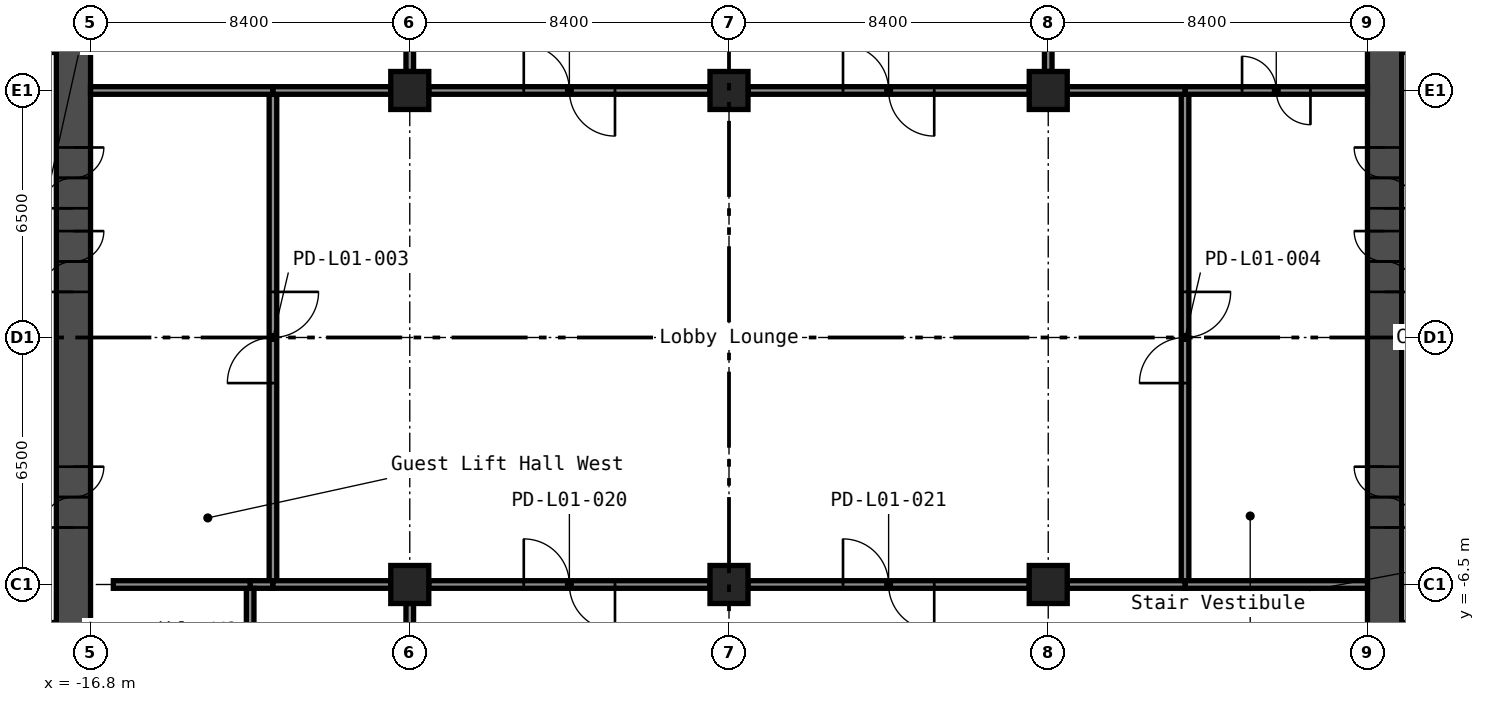
"""IFC4 building model, lengths in metres.
Left out: names, types, materials, properties, quantities, classifications, styles, units other than length and angle.
Written with IfcOpenShell. Run it as: python <this file> out.ifc"""

import sys

from ifc_helpers import new_model, si_unit, direction, frame, frame_2d, origin, origin_2d, place, context, subcontext, project, spatial, rectangle, hollow_rectangle, extrude, element, fill, save


model = new_model("IFC4")
c1 = context("Model", 3, precision=1e-05, world=origin(), true_north=direction((0.0, 1.0)))
c2 = subcontext(c1, "Body", "Model", "MODEL_VIEW")
j1 = project(units=[si_unit("LENGTHUNIT", "METRE"), si_unit("PLANEANGLEUNIT", "RADIAN")], contexts=[c1])
p1 = place(None, origin())
s1 = spatial("IfcSite", under=j1, at=p1, CompositionType="ELEMENT")
p2 = place(p1, origin())
s2 = spatial("IfcBuilding", under=s1, at=p2, CompositionType="ELEMENT")
p3 = place(p2, origin())
s3 = spatial("IfcBuildingStorey", under=s2, at=p3, CompositionType="ELEMENT", Elevation=0.0)
for number, where, z_axis, x_axis in (
    (1, (-8.4, -6.5, -0.3), (0.0, 0.0, 1.0), (1.0, 0.0, 0.0)),
    (2, (-8.4, 6.5, -0.3), (0.0, 0.0, 1.0), (1.0, 0.0, 0.0)),
    (3, (0.0, -6.5, -0.3), (0.0, 0.0, 1.0), (1.0, 0.0, 0.0)),
    (4, (0.0, 6.5, -0.3), (0.0, 0.0, 1.0), (1.0, 0.0, 0.0)),
    (5, (8.4, -6.5, -0.3), (0.0, 0.0, 1.0), (1.0, 0.0, 0.0)),
    (6, (8.4, 6.5, -0.3), (0.0, 0.0, 1.0), (1.0, 0.0, 0.0)),
):
    element("IfcColumn", number, at=place(p3, frame(where, z_axis=z_axis, x_axis=x_axis)), inside=s3, PredefinedType="COLUMN", context=c2, shape_type="SweptSolid", body=[
        extrude(hollow_rectangle(XDim=1.0, YDim=1.0, WallThickness=0.04, at=origin_2d()), origin(), (0.0, 0.0, 1.0), 8.9),
    ])
p4 = place(p3, frame((-17.25, -8.4, 0.0), z_axis=(0.0, 0.0, 1.0), x_axis=(0.0, 1.0, 0.0)))
e7 = element("IfcWall", 7, at=p4, inside=s3, PredefinedType="SHEAR", context=c2, shape_type="SweptSolid", body=[
    extrude(rectangle(XDim=16.8, YDim=0.9, at=frame_2d((8.4, 0.0))), origin(), (0.0, 0.0, 1.0), 8.6),
])
p5 = place(p4, frame((3.4, 0.0, 0.0)))
e8 = element("IfcOpeningElement", 8, at=p5, cuts=e7, PredefinedType="OPENING", context=c2, shape_type="SweptSolid", body=[
    extrude(rectangle(XDim=1.6, YDim=2.1, at=frame_2d((0.8, 1.05))), frame((0.0, 0.46, 0.0), z_axis=(0.0, -1.0, 0.0), x_axis=(1.0, 0.0, 0.0)), (0.0, 0.0, 1.0), 0.92),
])
p6 = place(p4, frame((9.6, 0.0, 0.0)))
e9 = element("IfcOpeningElement", 9, at=p6, cuts=e7, PredefinedType="OPENING", context=c2, shape_type="SweptSolid", body=[
    extrude(rectangle(XDim=1.6, YDim=2.1, at=frame_2d((0.8, 1.05))), frame((0.0, 0.46, 0.0), z_axis=(0.0, -1.0, 0.0), x_axis=(1.0, 0.0, 0.0)), (0.0, 0.0, 1.0), 0.92),
])
p7 = place(p4, frame((11.8, 0.0, 0.0)))
e10 = element("IfcOpeningElement", 10, at=p7, cuts=e7, PredefinedType="OPENING", context=c2, shape_type="SweptSolid", body=[
    extrude(rectangle(XDim=1.6, YDim=2.1, at=frame_2d((0.8, 1.05))), frame((0.0, 0.46, 0.0), z_axis=(0.0, -1.0, 0.0), x_axis=(1.0, 0.0, 0.0)), (0.0, 0.0, 1.0), 0.92),
])
p8 = place(p3, frame((17.25, -8.4, 0.0), z_axis=(0.0, 0.0, 1.0), x_axis=(0.0, 1.0, 0.0)))
e11 = element("IfcWall", 11, at=p8, inside=s3, PredefinedType="SHEAR", context=c2, shape_type="SweptSolid", body=[
    extrude(rectangle(XDim=16.8, YDim=0.9, at=frame_2d((8.4, 0.0))), origin(), (0.0, 0.0, 1.0), 8.6),
])
p9 = place(p8, frame((3.4, 0.0, 0.0)))
e12 = element("IfcOpeningElement", 12, at=p9, cuts=e11, PredefinedType="OPENING", context=c2, shape_type="SweptSolid", body=[
    extrude(rectangle(XDim=1.6, YDim=2.1, at=frame_2d((0.8, 1.05))), frame((0.0, 0.46, 0.0), z_axis=(0.0, -1.0, 0.0), x_axis=(1.0, 0.0, 0.0)), (0.0, 0.0, 1.0), 0.92),
])
p10 = place(p8, frame((9.6, 0.0, 0.0)))
e13 = element("IfcOpeningElement", 13, at=p10, cuts=e11, PredefinedType="OPENING", context=c2, shape_type="SweptSolid", body=[
    extrude(rectangle(XDim=1.6, YDim=2.1, at=frame_2d((0.8, 1.05))), frame((0.0, 0.46, 0.0), z_axis=(0.0, -1.0, 0.0), x_axis=(1.0, 0.0, 0.0)), (0.0, 0.0, 1.0), 0.92),
])
p11 = place(p8, frame((11.8, 0.0, 0.0)))
e14 = element("IfcOpeningElement", 14, at=p11, cuts=e11, PredefinedType="OPENING", context=c2, shape_type="SweptSolid", body=[
    extrude(rectangle(XDim=1.6, YDim=2.1, at=frame_2d((0.8, 1.05))), frame((0.0, 0.46, 0.0), z_axis=(0.0, -1.0, 0.0), x_axis=(1.0, 0.0, 0.0)), (0.0, 0.0, 1.0), 0.92),
])
p12 = place(p3, frame((12.0, -6.4, 0.0), z_axis=(0.0, 0.0, 1.0), x_axis=(0.0, 1.0, 0.0)))
e15 = element("IfcWall", 15, at=p12, inside=s3, PredefinedType="PARTITIONING", context=c2, shape_type="SweptSolid", body=[
    extrude(rectangle(XDim=12.8, YDim=0.2, at=frame_2d((6.4, 0.0))), origin(), (0.0, 0.0, 1.0), 8.6),
])
p13 = place(p12, frame((5.2, 0.0, 0.0)))
e16 = element("IfcOpeningElement", 16, at=p13, cuts=e15, PredefinedType="OPENING", context=c2, shape_type="SweptSolid", body=[
    extrude(rectangle(XDim=2.4, YDim=2.1, at=frame_2d((1.2, 1.05))), frame((0.0, 0.11, 0.0), z_axis=(0.0, -1.0, 0.0), x_axis=(1.0, 0.0, 0.0)), (0.0, 0.0, 1.0), 0.22),
])
p14 = place(p3, frame((12.0, 6.5, 0.0), z_axis=(0.0, 0.0, 1.0), x_axis=(1.0, 0.0, 0.0)))
e17 = element("IfcWall", 17, at=p14, inside=s3, PredefinedType="PARTITIONING", context=c2, shape_type="SweptSolid", body=[
    extrude(rectangle(XDim=4.8, YDim=0.2, at=frame_2d((2.4, 0.0))), origin(), (0.0, 0.0, 1.0), 8.6),
])
p15 = place(p14, frame((1.5, 0.0, 0.0)))
e18 = element("IfcOpeningElement", 18, at=p15, cuts=e17, PredefinedType="OPENING", context=c2, shape_type="SweptSolid", body=[
    extrude(rectangle(XDim=1.8, YDim=2.1, at=frame_2d((0.9, 1.05))), frame((0.0, 0.11, 0.0), z_axis=(0.0, -1.0, 0.0), x_axis=(1.0, 0.0, 0.0)), (0.0, 0.0, 1.0), 0.22),
])
p16 = place(p3, frame((-12.0, 6.4, 0.0), z_axis=(0.0, 0.0, 1.0), x_axis=(0.0, -1.0, 0.0)))
e19 = element("IfcWall", 19, at=p16, inside=s3, PredefinedType="PARTITIONING", context=c2, shape_type="SweptSolid", body=[
    extrude(rectangle(XDim=12.8, YDim=0.2, at=frame_2d((6.4, 0.0))), origin(), (0.0, 0.0, 1.0), 8.6),
])
p17 = place(p16, frame((5.2, 0.0, 0.0)))
e20 = element("IfcOpeningElement", 20, at=p17, cuts=e19, PredefinedType="OPENING", context=c2, shape_type="SweptSolid", body=[
    extrude(rectangle(XDim=2.4, YDim=2.1, at=frame_2d((1.2, 1.05))), frame((0.0, 0.11, 0.0), z_axis=(0.0, -1.0, 0.0), x_axis=(1.0, 0.0, 0.0)), (0.0, 0.0, 1.0), 0.22),
])
p18 = place(p3, frame((-16.8, 6.5, 0.0), z_axis=(0.0, 0.0, 1.0), x_axis=(1.0, 0.0, 0.0)))
e21 = element("IfcWall", 21, at=p18, inside=s3, PredefinedType="PARTITIONING", context=c2, shape_type="SweptSolid", body=[
    extrude(rectangle(XDim=4.8, YDim=0.2, at=frame_2d((2.4, 0.0))), origin(), (0.0, 0.0, 1.0), 8.6),
])
p19 = place(p3, frame((8.9, 6.5, 0.0), z_axis=(0.0, 0.0, 1.0), x_axis=(1.0, 0.0, 0.0)))
e22 = element("IfcWall", 22, at=p19, inside=s3, PredefinedType="PARTITIONING", context=c2, shape_type="SweptSolid", body=[
    extrude(rectangle(XDim=3.1, YDim=0.2, at=frame_2d((1.55, 0.0))), origin(), (0.0, 0.0, 1.0), 8.6),
])
p20 = place(p3, frame((-7.9, 6.5, 0.0), z_axis=(0.0, 0.0, 1.0), x_axis=(1.0, 0.0, 0.0)))
e23 = element("IfcWall", 23, at=p20, inside=s3, PredefinedType="PARTITIONING", context=c2, shape_type="SweptSolid", body=[
    extrude(rectangle(XDim=7.4, YDim=0.2, at=frame_2d((3.7, 0.0))), origin(), (0.0, 0.0, 1.0), 8.6),
])
p21 = place(p20, frame((2.5, 0.0, 0.0)))
e24 = element("IfcOpeningElement", 24, at=p21, cuts=e23, PredefinedType="OPENING", context=c2, shape_type="SweptSolid", body=[
    extrude(rectangle(XDim=2.4, YDim=2.1, at=frame_2d((1.2, 1.05))), frame((0.0, 0.11, 0.0), z_axis=(0.0, -1.0, 0.0), x_axis=(1.0, 0.0, 0.0)), (0.0, 0.0, 1.0), 0.22),
])
p22 = place(p3, frame((0.5, 6.5, 0.0), z_axis=(0.0, 0.0, 1.0), x_axis=(1.0, 0.0, 0.0)))
e25 = element("IfcWall", 25, at=p22, inside=s3, PredefinedType="PARTITIONING", context=c2, shape_type="SweptSolid", body=[
    extrude(rectangle(XDim=7.4, YDim=0.2, at=frame_2d((3.7, 0.0))), origin(), (0.0, 0.0, 1.0), 8.6),
])
p23 = place(p22, frame((2.5, 0.0, 0.0)))
e26 = element("IfcOpeningElement", 26, at=p23, cuts=e25, PredefinedType="OPENING", context=c2, shape_type="SweptSolid", body=[
    extrude(rectangle(XDim=2.4, YDim=2.1, at=frame_2d((1.2, 1.05))), frame((0.0, 0.11, 0.0), z_axis=(0.0, -1.0, 0.0), x_axis=(1.0, 0.0, 0.0)), (0.0, 0.0, 1.0), 0.22),
])
p24 = place(p3, frame((-12.0, 6.5, 0.0), z_axis=(0.0, 0.0, 1.0), x_axis=(1.0, 0.0, 0.0)))
e27 = element("IfcWall", 27, at=p24, inside=s3, PredefinedType="PARTITIONING", context=c2, shape_type="SweptSolid", body=[
    extrude(rectangle(XDim=3.1, YDim=0.2, at=frame_2d((1.55, 0.0))), origin(), (0.0, 0.0, 1.0), 8.6),
])
p25 = place(p3, frame((8.4, 19.15, 0.0), z_axis=(0.0, 0.0, 1.0), x_axis=(0.0, -1.0, 0.0)))
e28 = element("IfcWall", 28, at=p25, inside=s3, PredefinedType="PARTITIONING", context=c2, shape_type="SweptSolid", body=[
    extrude(rectangle(XDim=12.15, YDim=0.2, at=frame_2d((6.075, 0.0))), origin(), (0.0, 0.0, 1.0), 8.6),
])
p26 = place(p25, frame((1.95, 0.0, 0.0)))
e29 = element("IfcOpeningElement", 29, at=p26, cuts=e28, PredefinedType="OPENING", context=c2, shape_type="SweptSolid", body=[
    extrude(rectangle(XDim=1.8, YDim=2.1, at=frame_2d((0.9, 1.05))), frame((0.0, 0.11, 0.0), z_axis=(0.0, -1.0, 0.0), x_axis=(1.0, 0.0, 0.0)), (0.0, 0.0, 1.0), 0.22),
])
p27 = place(p3, frame((-8.4, 7.0, 0.0), z_axis=(0.0, 0.0, 1.0), x_axis=(0.0, 1.0, 0.0)))
e30 = element("IfcWall", 30, at=p27, inside=s3, PredefinedType="PARTITIONING", context=c2, shape_type="SweptSolid", body=[
    extrude(rectangle(XDim=6.05, YDim=0.2, at=frame_2d((3.025, 0.0))), origin(), (0.0, 0.0, 1.0), 8.6),
])
p28 = place(p27, frame((1.9, 0.0, 0.0)))
e31 = element("IfcOpeningElement", 31, at=p28, cuts=e30, PredefinedType="OPENING", context=c2, shape_type="SweptSolid", body=[
    extrude(rectangle(XDim=1.8, YDim=2.1, at=frame_2d((0.9, 1.05))), frame((0.0, 0.11, 0.0), z_axis=(0.0, -1.0, 0.0), x_axis=(1.0, 0.0, 0.0)), (0.0, 0.0, 1.0), 0.22),
])
p29 = place(p3, frame((12.0, -6.5, 0.0), z_axis=(0.0, 0.0, 1.0), x_axis=(1.0, 0.0, 0.0)))
e32 = element("IfcWall", 32, at=p29, inside=s3, PredefinedType="PARTITIONING", context=c2, shape_type="SweptSolid", body=[
    extrude(rectangle(XDim=4.8, YDim=0.2, at=frame_2d((2.4, 0.0))), origin(), (0.0, 0.0, 1.0), 8.6),
])
p30 = place(p3, frame((-7.9, -6.5, 0.0), z_axis=(0.0, 0.0, 1.0), x_axis=(1.0, 0.0, 0.0)))
e33 = element("IfcWall", 33, at=p30, inside=s3, PredefinedType="PARTITIONING", context=c2, shape_type="SweptSolid", body=[
    extrude(rectangle(XDim=7.4, YDim=0.2, at=frame_2d((3.7, 0.0))), origin(), (0.0, 0.0, 1.0), 8.6),
])
p31 = place(p30, frame((2.5, 0.0, 0.0)))
e34 = element("IfcOpeningElement", 34, at=p31, cuts=e33, PredefinedType="OPENING", context=c2, shape_type="SweptSolid", body=[
    extrude(rectangle(XDim=2.4, YDim=2.1, at=frame_2d((1.2, 1.05))), frame((0.0, 0.11, 0.0), z_axis=(0.0, -1.0, 0.0), x_axis=(1.0, 0.0, 0.0)), (0.0, 0.0, 1.0), 0.22),
])
p32 = place(p3, frame((0.5, -6.5, 0.0), z_axis=(0.0, 0.0, 1.0), x_axis=(1.0, 0.0, 0.0)))
e35 = element("IfcWall", 35, at=p32, inside=s3, PredefinedType="PARTITIONING", context=c2, shape_type="SweptSolid", body=[
    extrude(rectangle(XDim=7.4, YDim=0.2, at=frame_2d((3.7, 0.0))), origin(), (0.0, 0.0, 1.0), 8.6),
])
p33 = place(p32, frame((2.5, 0.0, 0.0)))
e36 = element("IfcOpeningElement", 36, at=p33, cuts=e35, PredefinedType="OPENING", context=c2, shape_type="SweptSolid", body=[
    extrude(rectangle(XDim=2.4, YDim=2.1, at=frame_2d((1.2, 1.05))), frame((0.0, 0.11, 0.0), z_axis=(0.0, -1.0, 0.0), x_axis=(1.0, 0.0, 0.0)), (0.0, 0.0, 1.0), 0.22),
])
p34 = place(p3, frame((8.9, -6.5, 0.0), z_axis=(0.0, 0.0, 1.0), x_axis=(1.0, 0.0, 0.0)))
e37 = element("IfcWall", 37, at=p34, inside=s3, PredefinedType="PARTITIONING", context=c2, shape_type="SweptSolid", body=[
    extrude(rectangle(XDim=3.1, YDim=0.2, at=frame_2d((1.55, 0.0))), origin(), (0.0, 0.0, 1.0), 8.6),
])
p35 = place(p3, frame((-12.6, -6.5, 0.0), z_axis=(0.0, 0.0, 1.0), x_axis=(1.0, 0.0, 0.0)))
e38 = element("IfcWall", 38, at=p35, inside=s3, PredefinedType="PARTITIONING", context=c2, shape_type="SweptSolid", body=[
    extrude(rectangle(XDim=0.6, YDim=0.2, at=frame_2d((0.3, 0.0))), origin(), (0.0, 0.0, 1.0), 8.6),
])
p36 = place(p3, frame((-12.0, -6.5, 0.0), z_axis=(0.0, 0.0, 1.0), x_axis=(1.0, 0.0, 0.0)))
e39 = element("IfcWall", 39, at=p36, inside=s3, PredefinedType="PARTITIONING", context=c2, shape_type="SweptSolid", body=[
    extrude(rectangle(XDim=3.1, YDim=0.2, at=frame_2d((1.55, 0.0))), origin(), (0.0, 0.0, 1.0), 8.6),
])
p37 = place(p3, frame((-8.4, -7.0, 0.0), z_axis=(0.0, 0.0, 1.0), x_axis=(0.0, -1.0, 0.0)))
e40 = element("IfcWall", 40, at=p37, inside=s3, PredefinedType="PARTITIONING", context=c2, shape_type="SweptSolid", body=[
    extrude(rectangle(XDim=12.15, YDim=0.2, at=frame_2d((6.075, 0.0))), origin(), (0.0, 0.0, 1.0), 8.6),
])
p38 = place(p37, frame((8.7, 0.0, 0.0)))
e41 = element("IfcOpeningElement", 41, at=p38, cuts=e40, PredefinedType="OPENING", context=c2, shape_type="SweptSolid", body=[
    extrude(rectangle(XDim=1.2, YDim=2.1, at=frame_2d((0.6, 1.05))), frame((0.0, 0.11, 0.0), z_axis=(0.0, -1.0, 0.0), x_axis=(1.0, 0.0, 0.0)), (0.0, 0.0, 1.0), 0.22),
])
p39 = place(p3, frame((-12.6, -11.5, 0.0), z_axis=(0.0, 0.0, 1.0), x_axis=(0.0, 1.0, 0.0)))
e42 = element("IfcWall", 42, at=p39, inside=s3, PredefinedType="PARTITIONING", context=c2, shape_type="SweptSolid", body=[
    extrude(rectangle(XDim=4.9, YDim=0.2, at=frame_2d((2.45, 0.0))), origin(), (0.0, 0.0, 1.0), 8.6),
])
p40 = place(p39, frame((2.0, 0.0, 0.0)))
e43 = element("IfcOpeningElement", 43, at=p40, cuts=e42, PredefinedType="OPENING", context=c2, shape_type="SweptSolid", body=[
    extrude(rectangle(XDim=1.0, YDim=2.1, at=frame_2d((0.5, 1.05))), frame((0.0, 0.11, 0.0), z_axis=(0.0, -1.0, 0.0), x_axis=(1.0, 0.0, 0.0)), (0.0, 0.0, 1.0), 0.22),
])
p41 = place(p3, frame((-16.2, -6.5, 0.0), z_axis=(0.0, 0.0, 1.0), x_axis=(1.0, 0.0, 0.0)))
e44 = element("IfcWall", 44, at=p41, inside=s3, PredefinedType="PARTITIONING", context=c2, shape_type="SweptSolid", body=[
    extrude(rectangle(XDim=3.6, YDim=0.2, at=frame_2d((1.8, 0.0))), origin(), (0.0, 0.0, 1.0), 8.6),
])
p42 = place(p5, origin())
e45 = element("IfcDoor", 45, at=p42, inside=s3, OperationType="DOUBLE_DOOR_SINGLE_SWING", PredefinedType="DOOR", context=c2, shape_type="SweptSolid", body=[
    extrude(rectangle(XDim=1.6, YDim=2.1, at=frame_2d((0.8, 1.05))), frame((0.0, 0.025, 0.0), z_axis=(0.0, -1.0, 0.0), x_axis=(1.0, 0.0, 0.0)), (0.0, 0.0, 1.0), 0.05),
])
fill(e8, e45)
p43 = place(p6, origin())
e46 = element("IfcDoor", 46, at=p43, inside=s3, OperationType="DOUBLE_DOOR_SINGLE_SWING", PredefinedType="DOOR", context=c2, shape_type="SweptSolid", body=[
    extrude(rectangle(XDim=1.6, YDim=2.1, at=frame_2d((0.8, 1.05))), frame((0.0, 0.025, 0.0), z_axis=(0.0, -1.0, 0.0), x_axis=(1.0, 0.0, 0.0)), (0.0, 0.0, 1.0), 0.05),
])
fill(e9, e46)
p44 = place(p7, origin())
e47 = element("IfcDoor", 47, at=p44, inside=s3, OperationType="DOUBLE_DOOR_SINGLE_SWING", PredefinedType="DOOR", context=c2, shape_type="SweptSolid", body=[
    extrude(rectangle(XDim=1.6, YDim=2.1, at=frame_2d((0.8, 1.05))), frame((0.0, 0.025, 0.0), z_axis=(0.0, -1.0, 0.0), x_axis=(1.0, 0.0, 0.0)), (0.0, 0.0, 1.0), 0.05),
])
fill(e10, e47)
p45 = place(p9, origin())
e48 = element("IfcDoor", 48, at=p45, inside=s3, OperationType="DOUBLE_DOOR_SINGLE_SWING", PredefinedType="DOOR", context=c2, shape_type="SweptSolid", body=[
    extrude(rectangle(XDim=1.6, YDim=2.1, at=frame_2d((0.8, 1.05))), frame((0.0, 0.025, 0.0), z_axis=(0.0, -1.0, 0.0), x_axis=(1.0, 0.0, 0.0)), (0.0, 0.0, 1.0), 0.05),
])
fill(e12, e48)
p46 = place(p10, origin())
e49 = element("IfcDoor", 49, at=p46, inside=s3, OperationType="DOUBLE_DOOR_SINGLE_SWING", PredefinedType="DOOR", context=c2, shape_type="SweptSolid", body=[
    extrude(rectangle(XDim=1.6, YDim=2.1, at=frame_2d((0.8, 1.05))), frame((0.0, 0.025, 0.0), z_axis=(0.0, -1.0, 0.0), x_axis=(1.0, 0.0, 0.0)), (0.0, 0.0, 1.0), 0.05),
])
fill(e13, e49)
p47 = place(p11, origin())
e50 = element("IfcDoor", 50, at=p47, inside=s3, OperationType="DOUBLE_DOOR_SINGLE_SWING", PredefinedType="DOOR", context=c2, shape_type="SweptSolid", body=[
    extrude(rectangle(XDim=1.6, YDim=2.1, at=frame_2d((0.8, 1.05))), frame((0.0, 0.025, 0.0), z_axis=(0.0, -1.0, 0.0), x_axis=(1.0, 0.0, 0.0)), (0.0, 0.0, 1.0), 0.05),
])
fill(e14, e50)
p48 = place(p21, origin())
e51 = element("IfcDoor", 51, at=p48, inside=s3, OperationType="DOUBLE_DOOR_DOUBLE_SWING", PredefinedType="DOOR", context=c2, shape_type="SweptSolid", body=[
    extrude(rectangle(XDim=2.4, YDim=2.1, at=frame_2d((1.2, 1.05))), frame((0.0, 0.025, 0.0), z_axis=(0.0, -1.0, 0.0), x_axis=(1.0, 0.0, 0.0)), (0.0, 0.0, 1.0), 0.05),
])
fill(e24, e51)
p49 = place(p23, origin())
e52 = element("IfcDoor", 52, at=p49, inside=s3, OperationType="DOUBLE_DOOR_DOUBLE_SWING", PredefinedType="DOOR", context=c2, shape_type="SweptSolid", body=[
    extrude(rectangle(XDim=2.4, YDim=2.1, at=frame_2d((1.2, 1.05))), frame((0.0, 0.025, 0.0), z_axis=(0.0, -1.0, 0.0), x_axis=(1.0, 0.0, 0.0)), (0.0, 0.0, 1.0), 0.05),
])
fill(e26, e52)
p50 = place(p17, origin())
e53 = element("IfcDoor", 53, at=p50, inside=s3, OperationType="DOUBLE_DOOR_DOUBLE_SWING", PredefinedType="DOOR", context=c2, shape_type="SweptSolid", body=[
    extrude(rectangle(XDim=2.4, YDim=2.1, at=frame_2d((1.2, 1.05))), frame((0.0, 0.025, 0.0), z_axis=(0.0, -1.0, 0.0), x_axis=(1.0, 0.0, 0.0)), (0.0, 0.0, 1.0), 0.05),
])
fill(e20, e53)
p51 = place(p13, origin())
e54 = element("IfcDoor", 54, at=p51, inside=s3, OperationType="DOUBLE_DOOR_DOUBLE_SWING", PredefinedType="DOOR", context=c2, shape_type="SweptSolid", body=[
    extrude(rectangle(XDim=2.4, YDim=2.1, at=frame_2d((1.2, 1.05))), frame((0.0, 0.025, 0.0), z_axis=(0.0, -1.0, 0.0), x_axis=(1.0, 0.0, 0.0)), (0.0, 0.0, 1.0), 0.05),
])
fill(e16, e54)
p52 = place(p15, origin())
e55 = element("IfcDoor", 55, at=p52, inside=s3, OperationType="DOUBLE_DOOR_DOUBLE_SWING", PredefinedType="DOOR", context=c2, shape_type="SweptSolid", body=[
    extrude(rectangle(XDim=1.8, YDim=2.1, at=frame_2d((0.9, 1.05))), frame((0.0, 0.025, 0.0), z_axis=(0.0, -1.0, 0.0), x_axis=(1.0, 0.0, 0.0)), (0.0, 0.0, 1.0), 0.05),
])
fill(e18, e55)
p53 = place(p31, origin())
e56 = element("IfcDoor", 56, at=p53, inside=s3, OperationType="DOUBLE_DOOR_DOUBLE_SWING", PredefinedType="DOOR", context=c2, shape_type="SweptSolid", body=[
    extrude(rectangle(XDim=2.4, YDim=2.1, at=frame_2d((1.2, 1.05))), frame((0.0, 0.025, 0.0), z_axis=(0.0, -1.0, 0.0), x_axis=(1.0, 0.0, 0.0)), (0.0, 0.0, 1.0), 0.05),
])
fill(e34, e56)
p54 = place(p33, origin())
e57 = element("IfcDoor", 57, at=p54, inside=s3, OperationType="DOUBLE_DOOR_DOUBLE_SWING", PredefinedType="DOOR", context=c2, shape_type="SweptSolid", body=[
    extrude(rectangle(XDim=2.4, YDim=2.1, at=frame_2d((1.2, 1.05))), frame((0.0, 0.025, 0.0), z_axis=(0.0, -1.0, 0.0), x_axis=(1.0, 0.0, 0.0)), (0.0, 0.0, 1.0), 0.05),
])
fill(e36, e57)
save(model, sys.argv[1])
